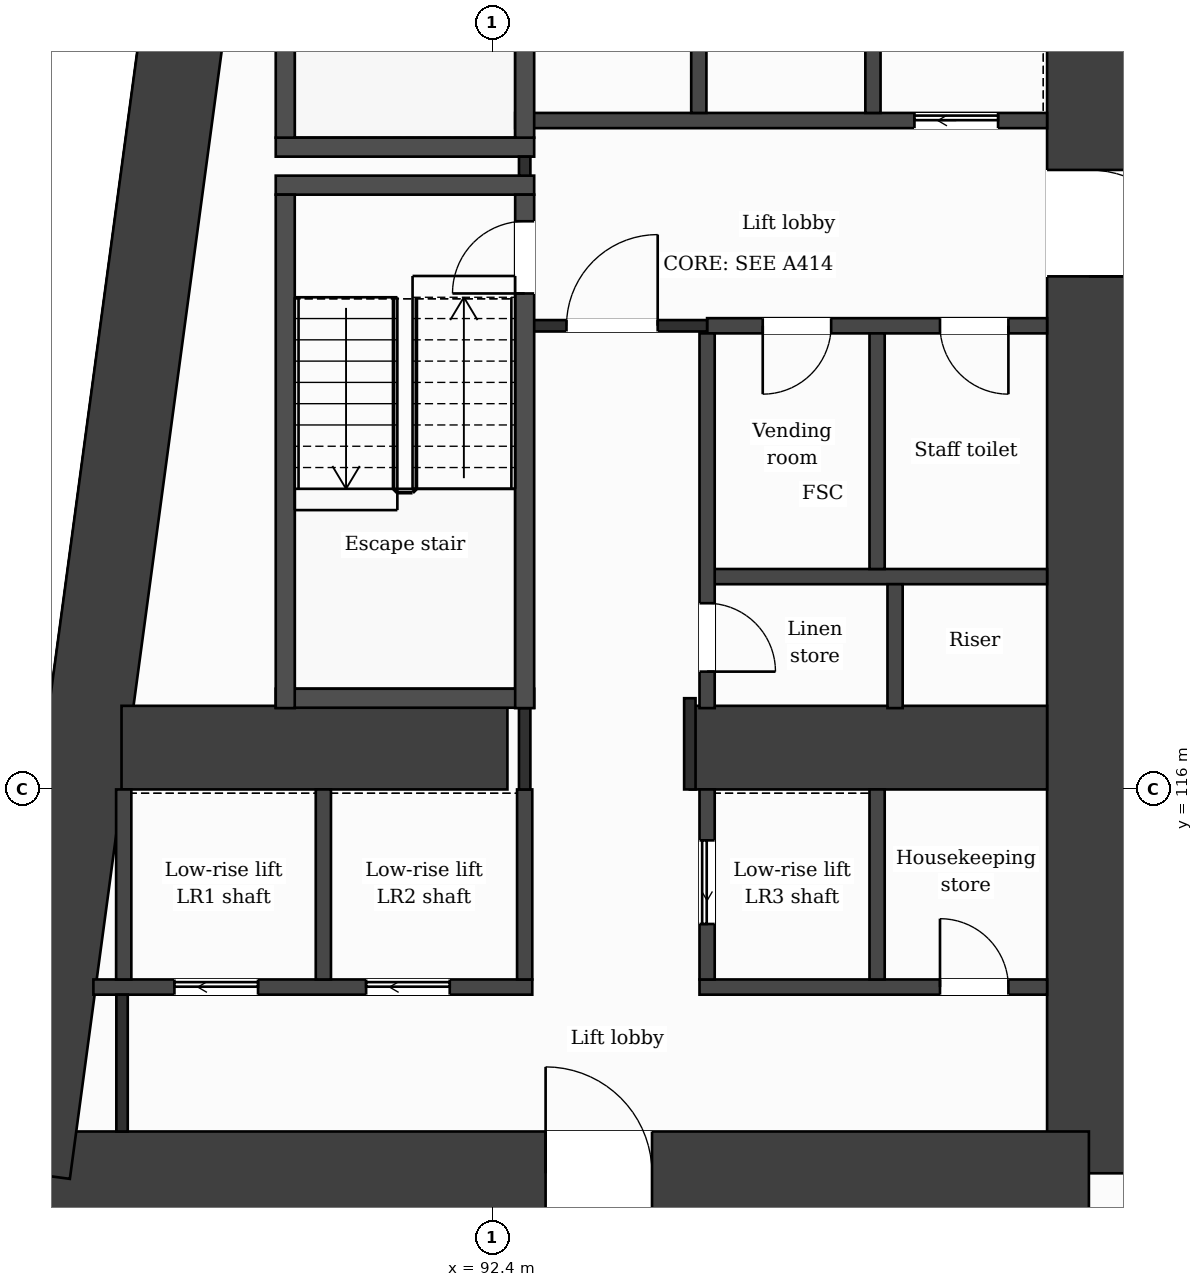
"""IFC4 building model, lengths in metres.
Left out: names, types, materials, properties, quantities, classifications, styles, units other than length and angle.
Written with IfcOpenShell. Run it as: python <this file> out.ifc"""

import sys

from ifc_helpers import new_model, si_unit, direction, frame, frame_2d, origin, place, context, subcontext, project, spatial, rectangle, extrude, element, fill, save


model = new_model("IFC4")
c1 = context("Model", 3, precision=1e-05, world=origin(), true_north=direction((0.0, 1.0)))
c2 = subcontext(c1, "Body", "Model", "MODEL_VIEW")
j1 = project(units=[si_unit("LENGTHUNIT", "METRE"), si_unit("PLANEANGLEUNIT", "RADIAN")], contexts=[c1])
p1 = place(None, origin())
s1 = spatial("IfcSite", under=j1, at=p1, CompositionType="ELEMENT")
p2 = place(p1, origin())
s2 = spatial("IfcBuilding", under=s1, at=p2, CompositionType="ELEMENT")
p3 = place(p2, frame((0.0, 0.0, 63.5)))
s3 = spatial("IfcBuildingStorey", under=s2, at=p3, CompositionType="ELEMENT", Elevation=63.5)
p4 = place(p3, frame((100.25, 131.85, 0.0), z_axis=(0.0, 0.0, 1.0), x_axis=(0.0, -1.0, 0.0)))
e1 = element("IfcWall", 1, at=p4, inside=s3, PredefinedType="SHEAR", context=c2, shape_type="SweptSolid", body=[
    extrude(rectangle(XDim=20.9, YDim=1.1, at=frame_2d((10.45, 0.0))), origin(), (0.0, 0.0, 1.0), 3.5),
])
p5 = place(p4, frame((7.7, 0.0, 0.0)))
e2 = element("IfcOpeningElement", 2, at=p5, cuts=e1, PredefinedType="OPENING", context=c2, shape_type="SweptSolid", body=[
    extrude(rectangle(XDim=1.4, YDim=2.1, at=frame_2d((0.7, 1.05))), frame((0.0, 0.56, 0.0), z_axis=(0.0, -1.0, 0.0), x_axis=(1.0, 0.0, 0.0)), (0.0, 0.0, 1.0), 1.12),
])
p6 = place(p3, frame((100.25, 110.95, 0.0), z_axis=(0.0, 0.0, 1.0), x_axis=(-1.0, 0.0, 0.0)))
e3 = element("IfcWall", 3, at=p6, inside=s3, PredefinedType="SHEAR", context=c2, shape_type="SweptSolid", body=[
    extrude(rectangle(XDim=13.952, YDim=1.1, at=frame_2d((6.976, 0.0))), origin(), (0.0, 0.0, 1.0), 3.5),
])
p7 = place(p6, frame((5.748, 0.0, 0.0)))
e4 = element("IfcOpeningElement", 4, at=p7, cuts=e3, PredefinedType="OPENING", context=c2, shape_type="SweptSolid", body=[
    extrude(rectangle(XDim=1.4, YDim=2.1, at=frame_2d((0.7, 1.05))), frame((0.0, 0.56, 0.0), z_axis=(0.0, -1.0, 0.0), x_axis=(1.0, 0.0, 0.0)), (0.0, 0.0, 1.0), 1.12),
])
p8 = place(p3, frame((86.298, 110.95, 0.0), z_axis=(0.0, 0.0, 1.0), x_axis=(0.133400422634, 0.99106222168, 0.0)))
e5 = element("IfcWall", 5, at=p8, inside=s3, PredefinedType="SHEAR", context=c2, shape_type="SweptSolid", body=[
    extrude(rectangle(XDim=21.089, YDim=1.1, at=frame_2d((10.544, 0.0))), origin(), (0.0, 0.0, 1.0), 3.5),
])
p9 = place(p3, frame((87.523, 116.55, 0.0), z_axis=(0.0, 0.0, 1.0), x_axis=(1.0, 0.0, 0.0)))
e6 = element("IfcWall", 6, at=p9, inside=s3, PredefinedType="SHEAR", context=c2, shape_type="SweptSolid", body=[
    extrude(rectangle(XDim=5.077, YDim=1.1, at=frame_2d((2.539, 0.0))), origin(), (0.0, 0.0, 1.0), 3.5),
])
p10 = place(p3, frame((95.0, 116.55, 0.0), z_axis=(0.0, 0.0, 1.0), x_axis=(1.0, 0.0, 0.0)))
e7 = element("IfcWall", 7, at=p10, inside=s3, PredefinedType="SHEAR", context=c2, shape_type="SweptSolid", body=[
    extrude(rectangle(XDim=4.7, YDim=1.1, at=frame_2d((2.35, 0.0))), origin(), (0.0, 0.0, 1.0), 3.5),
])
p11 = place(p3, frame((87.153, 113.4, 0.0), z_axis=(0.0, 0.0, 1.0), x_axis=(1.0, 0.0, 0.0)))
e8 = element("IfcWall", 8, at=p11, inside=s3, PredefinedType="PARTITIONING", context=c2, shape_type="SweptSolid", body=[
    extrude(rectangle(XDim=5.774, YDim=0.2, at=frame_2d((2.887, 0.0))), origin(), (0.0, 0.0, 1.0), 3.18),
])
p12 = place(p11, frame((1.066, 0.0, 0.0)))
e9 = element("IfcOpeningElement", 9, at=p12, cuts=e8, PredefinedType="OPENING", context=c2, shape_type="SweptSolid", body=[
    extrude(rectangle(XDim=1.1, YDim=2.1, at=frame_2d((0.55, 1.05))), frame((0.0, 0.11, 0.0), z_axis=(0.0, -1.0, 0.0), x_axis=(1.0, 0.0, 0.0)), (0.0, 0.0, 1.0), 0.22),
])
p13 = place(p11, frame((3.588, 0.0, 0.0)))
e10 = element("IfcOpeningElement", 10, at=p13, cuts=e8, PredefinedType="OPENING", context=c2, shape_type="SweptSolid", body=[
    extrude(rectangle(XDim=1.1, YDim=2.1, at=frame_2d((0.55, 1.05))), frame((0.0, 0.11, 0.0), z_axis=(0.0, -1.0, 0.0), x_axis=(1.0, 0.0, 0.0)), (0.0, 0.0, 1.0), 0.22),
])
p14 = place(p3, frame((95.127, 113.4, 0.0), z_axis=(0.0, 0.0, 1.0), x_axis=(1.0, 0.0, 0.0)))
e11 = element("IfcWall", 11, at=p14, inside=s3, PredefinedType="PARTITIONING", context=c2, shape_type="SweptSolid", body=[
    extrude(rectangle(XDim=4.573, YDim=0.2, at=frame_2d((2.287, 0.0))), origin(), (0.0, 0.0, 1.0), 3.18),
])
p15 = place(p14, frame((3.164, 0.0, 0.0)))
e12 = element("IfcOpeningElement", 12, at=p15, cuts=e11, PredefinedType="OPENING", context=c2, shape_type="SweptSolid", body=[
    extrude(rectangle(XDim=0.9, YDim=2.1, at=frame_2d((0.45, 1.05))), frame((0.0, 0.11, 0.0), z_axis=(0.0, -1.0, 0.0), x_axis=(1.0, 0.0, 0.0)), (0.0, 0.0, 1.0), 0.22),
])
p16 = place(p3, frame((89.552, 117.2, 0.0), z_axis=(0.0, 0.0, 1.0), x_axis=(1.0, 0.0, 0.0)))
e13 = element("IfcWall", 13, at=p16, inside=s3, PredefinedType="PARTITIONING", context=c2, shape_type="SweptSolid", body=[
    extrude(rectangle(XDim=3.4, YDim=0.25, at=frame_2d((1.7, 0.0))), origin(), (0.0, 0.0, 1.0), 3.18),
])
p17 = place(p3, frame((95.227, 118.8, 0.0), z_axis=(0.0, 0.0, 1.0), x_axis=(1.0, 0.0, 0.0)))
e14 = element("IfcWall", 14, at=p17, inside=s3, PredefinedType="PARTITIONING", context=c2, shape_type="SweptSolid", body=[
    extrude(rectangle(XDim=4.473, YDim=0.2, at=frame_2d((2.236, 0.0))), origin(), (0.0, 0.0, 1.0), 3.18),
])
p18 = place(p3, frame((95.227, 122.1, 0.0), z_axis=(0.0, 0.0, 1.0), x_axis=(1.0, 0.0, 0.0)))
e15 = element("IfcWall", 15, at=p18, inside=s3, PredefinedType="PARTITIONING", context=c2, shape_type="SweptSolid", body=[
    extrude(rectangle(XDim=4.473, YDim=0.2, at=frame_2d((2.236, 0.0))), origin(), (0.0, 0.0, 1.0), 3.18),
])
p19 = place(p18, frame((0.732, 0.0, 0.0)))
e16 = element("IfcOpeningElement", 16, at=p19, cuts=e15, PredefinedType="OPENING", context=c2, shape_type="SweptSolid", body=[
    extrude(rectangle(XDim=0.9, YDim=2.1, at=frame_2d((0.45, 1.05))), frame((0.0, 0.11, 0.0), z_axis=(0.0, -1.0, 0.0), x_axis=(1.0, 0.0, 0.0)), (0.0, 0.0, 1.0), 0.22),
])
p20 = place(p18, frame((3.064, 0.0, 0.0)))
e17 = element("IfcOpeningElement", 17, at=p20, cuts=e15, PredefinedType="OPENING", context=c2, shape_type="SweptSolid", body=[
    extrude(rectangle(XDim=0.9, YDim=2.1, at=frame_2d((0.45, 1.05))), frame((0.0, 0.11, 0.0), z_axis=(0.0, -1.0, 0.0), x_axis=(1.0, 0.0, 0.0)), (0.0, 0.0, 1.0), 0.22),
])
p21 = place(p3, frame((92.827, 122.1, 0.0), z_axis=(0.0, 0.0, 1.0), x_axis=(1.0, 0.0, 0.0)))
e18 = element("IfcWall", 18, at=p21, inside=s3, PredefinedType="PARTITIONING", context=c2, shape_type="SweptSolid", body=[
    extrude(rectangle(XDim=2.4, YDim=0.15, at=frame_2d((1.2, 0.0))), origin(), (0.0, 0.0, 1.0), 3.18),
])
p22 = place(p21, frame((0.55, 0.0, 0.0)))
e19 = element("IfcOpeningElement", 19, at=p22, cuts=e18, PredefinedType="OPENING", context=c2, shape_type="SweptSolid", body=[
    extrude(rectangle(XDim=1.2, YDim=2.1, at=frame_2d((0.6, 1.05))), frame((0.0, 0.085, 0.0), z_axis=(0.0, -1.0, 0.0), x_axis=(1.0, 0.0, 0.0)), (0.0, 0.0, 1.0), 0.17),
])
for number, where, z_axis, x_axis in (
    (20, (89.552, 123.95, 0.0), (0.0, 0.0, 1.0), (1.0, 0.0, 0.0)),
    (21, (89.552, 124.45, 0.0), (0.0, 0.0, 1.0), (1.0, 0.0, 0.0)),
):
    element("IfcWall", number, at=place(p3, frame(where, z_axis=z_axis, x_axis=x_axis)), inside=s3, PredefinedType="PARTITIONING", context=c2, shape_type="SweptSolid", body=[
        extrude(rectangle(XDim=3.4, YDim=0.25, at=frame_2d((1.7, 0.0))), origin(), (0.0, 0.0, 1.0), 3.18),
    ])
p23 = place(p3, frame((92.702, 124.8, 0.0), z_axis=(0.0, 0.0, 1.0), x_axis=(1.0, 0.0, 0.0)))
e22 = element("IfcWall", 22, at=p23, inside=s3, PredefinedType="PARTITIONING", context=c2, shape_type="SweptSolid", body=[
    extrude(rectangle(XDim=6.998, YDim=0.2, at=frame_2d((3.499, 0.0))), origin(), (0.0, 0.0, 1.0), 3.18),
])
p24 = place(p23, frame((5.253, 0.0, 0.0)))
e23 = element("IfcOpeningElement", 23, at=p24, cuts=e22, PredefinedType="OPENING", context=c2, shape_type="SweptSolid", body=[
    extrude(rectangle(XDim=1.1, YDim=2.1, at=frame_2d((0.55, 1.05))), frame((0.0, 0.11, 0.0), z_axis=(0.0, -1.0, 0.0), x_axis=(1.0, 0.0, 0.0)), (0.0, 0.0, 1.0), 0.22),
])
p25 = place(p3, frame((87.552, 113.5, 0.0), z_axis=(0.0, 0.0, 1.0), x_axis=(0.0, 1.0, 0.0)))
e24 = element("IfcWall", 24, at=p25, inside=s3, PredefinedType="PARTITIONING", context=c2, shape_type="SweptSolid", body=[
    extrude(rectangle(XDim=2.5, YDim=0.2, at=frame_2d((1.25, 0.0))), origin(), (0.0, 0.0, 1.0), 3.18),
])
p26 = place(p3, frame((87.53, 111.5, 0.0), z_axis=(0.0, 0.0, 1.0), x_axis=(0.0, 1.0, 0.0)))
e25 = element("IfcWall", 25, at=p26, inside=s3, PredefinedType="PARTITIONING", context=c2, shape_type="SweptSolid", body=[
    extrude(rectangle(XDim=1.8, YDim=0.15, at=frame_2d((0.9, 0.0))), origin(), (0.0, 0.0, 1.0), 3.18),
])
p27 = place(p3, frame((89.677, 117.07, 0.0), z_axis=(0.0, 0.0, 1.0), x_axis=(0.0, 1.0, 0.0)))
e26 = element("IfcWall", 26, at=p27, inside=s3, PredefinedType="PARTITIONING", context=c2, shape_type="SweptSolid", body=[
    extrude(rectangle(XDim=6.755, YDim=0.25, at=frame_2d((3.377, 0.0))), origin(), (0.0, 0.0, 1.0), 3.18),
])
p28 = place(p3, frame((89.677, 124.575, 0.0), z_axis=(0.0, 0.0, 1.0), x_axis=(0.0, 1.0, 0.0)))
e27 = element("IfcWall", 27, at=p28, inside=s3, PredefinedType="PARTITIONING", context=c2, shape_type="SweptSolid", body=[
    extrude(rectangle(XDim=6.5, YDim=0.25, at=frame_2d((3.25, 0.0))), origin(), (0.0, 0.0, 1.0), 3.18),
])
for number, where, z_axis, x_axis in (
    (28, (90.178, 113.5, 0.0), (0.0, 0.0, 1.0), (0.0, 1.0, 0.0)),
    (29, (92.827, 113.5, 0.0), (0.0, 0.0, 1.0), (0.0, 1.0, 0.0)),
):
    element("IfcWall", number, at=place(p3, frame(where, z_axis=z_axis, x_axis=x_axis)), inside=s3, PredefinedType="PARTITIONING", context=c2, shape_type="SweptSolid", body=[
        extrude(rectangle(XDim=2.5, YDim=0.2, at=frame_2d((1.25, 0.0))), origin(), (0.0, 0.0, 1.0), 3.18),
    ])
p29 = place(p3, frame((92.827, 116.0, 0.0), z_axis=(0.0, 0.0, 1.0), x_axis=(0.0, 1.0, 0.0)))
e30 = element("IfcWall", 30, at=p29, inside=s3, PredefinedType="PARTITIONING", context=c2, shape_type="SweptSolid", body=[
    extrude(rectangle(XDim=1.07, YDim=0.15, at=frame_2d((0.535, 0.0))), origin(), (0.0, 0.0, 1.0), 3.18),
])
p30 = place(p3, frame((92.827, 124.075, 0.0), z_axis=(0.0, 0.0, 1.0), x_axis=(0.0, 1.0, 0.0)))
e31 = element("IfcWall", 31, at=p30, inside=s3, PredefinedType="PARTITIONING", context=c2, shape_type="SweptSolid", body=[
    extrude(rectangle(XDim=0.25, YDim=0.15, at=frame_2d((0.125, 0.0))), origin(), (0.0, 0.0, 1.0), 3.18),
])
p31 = place(p3, frame((92.827, 117.07, 0.0), z_axis=(0.0, 0.0, 1.0), x_axis=(0.0, 1.0, 0.0)))
e32 = element("IfcWall", 32, at=p31, inside=s3, PredefinedType="PARTITIONING", context=c2, shape_type="SweptSolid", body=[
    extrude(rectangle(XDim=6.755, YDim=0.25, at=frame_2d((3.377, 0.0))), origin(), (0.0, 0.0, 1.0), 3.18),
])
p32 = place(p31, frame((5.455, 0.0, 0.0)))
e33 = element("IfcOpeningElement", 33, at=p32, cuts=e32, PredefinedType="OPENING", context=c2, shape_type="SweptSolid", body=[
    extrude(rectangle(XDim=0.95, YDim=2.1, at=frame_2d((0.475, 1.05))), frame((0.0, 0.135, 0.0), z_axis=(0.0, -1.0, 0.0), x_axis=(1.0, 0.0, 0.0)), (0.0, 0.0, 1.0), 0.27),
])
p33 = place(p3, frame((92.827, 124.575, 0.0), z_axis=(0.0, 0.0, 1.0), x_axis=(0.0, 1.0, 0.0)))
e34 = element("IfcWall", 34, at=p33, inside=s3, PredefinedType="PARTITIONING", context=c2, shape_type="SweptSolid", body=[
    extrude(rectangle(XDim=6.755, YDim=0.25, at=frame_2d((3.377, 0.0))), origin(), (0.0, 0.0, 1.0), 3.18),
])
p34 = place(p33, frame((5.325, 0.0, 0.0)))
e35 = element("IfcOpeningElement", 35, at=p34, cuts=e34, PredefinedType="OPENING", context=c2, shape_type="SweptSolid", body=[
    extrude(rectangle(XDim=1.0, YDim=2.1, at=frame_2d((0.5, 1.05))), frame((0.0, 0.135, 0.0), z_axis=(0.0, -1.0, 0.0), x_axis=(1.0, 0.0, 0.0)), (0.0, 0.0, 1.0), 0.27),
])
p35 = place(p3, frame((95.0, 116.0, 0.0), z_axis=(0.0, 0.0, 1.0), x_axis=(0.0, 1.0, 0.0)))
e36 = element("IfcWall", 36, at=p35, inside=s3, PredefinedType="PARTITIONING", context=c2, shape_type="SweptSolid", body=[
    extrude(rectangle(XDim=1.2, YDim=0.15, at=frame_2d((0.6, 0.0))), origin(), (0.0, 0.0, 1.0), 3.18),
])
p36 = place(p3, frame((95.118, 124.9, 0.0), z_axis=(0.0, 0.0, 1.0), x_axis=(0.0, 1.0, 0.0)))
e37 = element("IfcWall", 37, at=p36, inside=s3, PredefinedType="PARTITIONING", context=c2, shape_type="SweptSolid", body=[
    extrude(rectangle(XDim=3.1, YDim=0.2, at=frame_2d((1.55, 0.0))), origin(), (0.0, 0.0, 1.0), 3.18),
])
p37 = place(p3, frame((95.227, 113.5, 0.0), z_axis=(0.0, 0.0, 1.0), x_axis=(0.0, 1.0, 0.0)))
e38 = element("IfcWall", 38, at=p37, inside=s3, PredefinedType="PARTITIONING", context=c2, shape_type="SweptSolid", body=[
    extrude(rectangle(XDim=2.5, YDim=0.2, at=frame_2d((1.25, 0.0))), origin(), (0.0, 0.0, 1.0), 3.18),
])
p38 = place(p37, frame((0.73, 0.0, 0.0)))
e39 = element("IfcOpeningElement", 39, at=p38, cuts=e38, PredefinedType="OPENING", context=c2, shape_type="SweptSolid", body=[
    extrude(rectangle(XDim=1.1, YDim=2.1, at=frame_2d((0.55, 1.05))), frame((0.0, 0.11, 0.0), z_axis=(0.0, -1.0, 0.0), x_axis=(1.0, 0.0, 0.0)), (0.0, 0.0, 1.0), 0.22),
])
p39 = place(p3, frame((95.227, 117.07, 0.0), z_axis=(0.0, 0.0, 1.0), x_axis=(0.0, 1.0, 0.0)))
e40 = element("IfcWall", 40, at=p39, inside=s3, PredefinedType="PARTITIONING", context=c2, shape_type="SweptSolid", body=[
    extrude(rectangle(XDim=4.93, YDim=0.2, at=frame_2d((2.465, 0.0))), origin(), (0.0, 0.0, 1.0), 3.18),
])
p40 = place(p39, frame((0.48, 0.0, 0.0)))
e41 = element("IfcOpeningElement", 41, at=p40, cuts=e40, PredefinedType="OPENING", context=c2, shape_type="SweptSolid", body=[
    extrude(rectangle(XDim=0.9, YDim=2.1, at=frame_2d((0.45, 1.05))), frame((0.0, 0.11, 0.0), z_axis=(0.0, -1.0, 0.0), x_axis=(1.0, 0.0, 0.0)), (0.0, 0.0, 1.0), 0.22),
])
p41 = place(p3, frame((97.409, 124.9, 0.0), z_axis=(0.0, 0.0, 1.0), x_axis=(0.0, 1.0, 0.0)))
e42 = element("IfcWall", 42, at=p41, inside=s3, PredefinedType="PARTITIONING", context=c2, shape_type="SweptSolid", body=[
    extrude(rectangle(XDim=3.1, YDim=0.2, at=frame_2d((1.55, 0.0))), origin(), (0.0, 0.0, 1.0), 3.18),
])
p42 = place(p3, frame((97.463, 113.5, 0.0), z_axis=(0.0, 0.0, 1.0), x_axis=(0.0, 1.0, 0.0)))
e43 = element("IfcWall", 43, at=p42, inside=s3, PredefinedType="PARTITIONING", context=c2, shape_type="SweptSolid", body=[
    extrude(rectangle(XDim=2.5, YDim=0.2, at=frame_2d((1.25, 0.0))), origin(), (0.0, 0.0, 1.0), 3.18),
])
p43 = place(p3, frame((97.463, 118.9, 0.0), z_axis=(0.0, 0.0, 1.0), x_axis=(0.0, 1.0, 0.0)))
e44 = element("IfcWall", 44, at=p43, inside=s3, PredefinedType="PARTITIONING", context=c2, shape_type="SweptSolid", body=[
    extrude(rectangle(XDim=3.1, YDim=0.2, at=frame_2d((1.55, 0.0))), origin(), (0.0, 0.0, 1.0), 3.18),
])
p44 = place(p3, frame((97.7, 117.07, 0.0), z_axis=(0.0, 0.0, 1.0), x_axis=(0.0, 1.0, 0.0)))
e45 = element("IfcWall", 45, at=p44, inside=s3, PredefinedType="PARTITIONING", context=c2, shape_type="SweptSolid", body=[
    extrude(rectangle(XDim=1.63, YDim=0.2, at=frame_2d((0.815, 0.0))), origin(), (0.0, 0.0, 1.0), 3.18),
])
p45 = place(p22, origin())
e46 = element("IfcDoor", 46, at=p45, inside=s3, OperationType="SINGLE_SWING_RIGHT", PredefinedType="DOOR", context=c2, shape_type="SweptSolid", body=[
    extrude(rectangle(XDim=1.2, YDim=2.1, at=frame_2d((0.6, 1.05))), frame((0.0, 0.025, 0.0), z_axis=(0.0, -1.0, 0.0), x_axis=(1.0, 0.0, 0.0)), (0.0, 0.0, 1.0), 0.05),
])
fill(e19, e46)
p46 = place(p24, origin())
e47 = element("IfcDoor", 47, at=p46, inside=s3, OperationType="SLIDING_TO_LEFT", PredefinedType="DOOR", context=c2, shape_type="SweptSolid", body=[
    extrude(rectangle(XDim=1.1, YDim=2.1, at=frame_2d((0.55, 1.05))), frame((0.0, 0.025, 0.0), z_axis=(0.0, -1.0, 0.0), x_axis=(1.0, 0.0, 0.0)), (0.0, 0.0, 1.0), 0.05),
])
fill(e23, e47)
p47 = place(p19, origin())
e48 = element("IfcDoor", 48, at=p47, inside=s3, OperationType="SINGLE_SWING_LEFT", PredefinedType="DOOR", context=c2, shape_type="SweptSolid", body=[
    extrude(rectangle(XDim=0.9, YDim=2.1, at=frame_2d((0.45, 1.05))), frame((0.0, 0.025, 0.0), z_axis=(0.0, -1.0, 0.0), x_axis=(1.0, 0.0, 0.0)), (0.0, 0.0, 1.0), 0.05),
])
fill(e16, e48)
p48 = place(p20, origin())
e49 = element("IfcDoor", 49, at=p48, inside=s3, OperationType="SINGLE_SWING_RIGHT", PredefinedType="DOOR", context=c2, shape_type="SweptSolid", body=[
    extrude(rectangle(XDim=0.9, YDim=2.1, at=frame_2d((0.45, 1.05))), frame((0.0, 0.025, 0.0), z_axis=(0.0, -1.0, 0.0), x_axis=(1.0, 0.0, 0.0)), (0.0, 0.0, 1.0), 0.05),
])
fill(e17, e49)
p49 = place(p32, origin())
e50 = element("IfcDoor", 50, at=p49, inside=s3, OperationType="SINGLE_SWING_LEFT", PredefinedType="DOOR", context=c2, shape_type="SweptSolid", body=[
    extrude(rectangle(XDim=0.95, YDim=2.1, at=frame_2d((0.475, 1.05))), frame((0.0, 0.025, 0.0), z_axis=(0.0, -1.0, 0.0), x_axis=(1.0, 0.0, 0.0)), (0.0, 0.0, 1.0), 0.05),
])
fill(e33, e50)
p50 = place(p40, origin())
e51 = element("IfcDoor", 51, at=p50, inside=s3, OperationType="SINGLE_SWING_LEFT", PredefinedType="DOOR", context=c2, shape_type="SweptSolid", body=[
    extrude(rectangle(XDim=0.9, YDim=2.1, at=frame_2d((0.45, 1.05))), frame((0.0, 0.025, 0.0), z_axis=(0.0, -1.0, 0.0), x_axis=(1.0, 0.0, 0.0)), (0.0, 0.0, 1.0), 0.05),
])
fill(e41, e51)
p51 = place(p12, origin())
e52 = element("IfcDoor", 52, at=p51, inside=s3, OperationType="SLIDING_TO_LEFT", PredefinedType="DOOR", context=c2, shape_type="SweptSolid", body=[
    extrude(rectangle(XDim=1.1, YDim=2.1, at=frame_2d((0.55, 1.05))), frame((0.0, 0.025, 0.0), z_axis=(0.0, -1.0, 0.0), x_axis=(1.0, 0.0, 0.0)), (0.0, 0.0, 1.0), 0.05),
])
fill(e9, e52)
p52 = place(p13, origin())
e53 = element("IfcDoor", 53, at=p52, inside=s3, OperationType="SLIDING_TO_LEFT", PredefinedType="DOOR", context=c2, shape_type="SweptSolid", body=[
    extrude(rectangle(XDim=1.1, YDim=2.1, at=frame_2d((0.55, 1.05))), frame((0.0, 0.025, 0.0), z_axis=(0.0, -1.0, 0.0), x_axis=(1.0, 0.0, 0.0)), (0.0, 0.0, 1.0), 0.05),
])
fill(e10, e53)
p53 = place(p38, origin())
e54 = element("IfcDoor", 54, at=p53, inside=s3, OperationType="SLIDING_TO_LEFT", PredefinedType="DOOR", context=c2, shape_type="SweptSolid", body=[
    extrude(rectangle(XDim=1.1, YDim=2.1, at=frame_2d((0.55, 1.05))), frame((0.0, 0.025, 0.0), z_axis=(0.0, -1.0, 0.0), x_axis=(1.0, 0.0, 0.0)), (0.0, 0.0, 1.0), 0.05),
])
fill(e39, e54)
p54 = place(p15, origin())
e55 = element("IfcDoor", 55, at=p54, inside=s3, OperationType="SINGLE_SWING_LEFT", PredefinedType="DOOR", context=c2, shape_type="SweptSolid", body=[
    extrude(rectangle(XDim=0.9, YDim=2.1, at=frame_2d((0.45, 1.05))), frame((0.0, 0.025, 0.0), z_axis=(0.0, -1.0, 0.0), x_axis=(1.0, 0.0, 0.0)), (0.0, 0.0, 1.0), 0.05),
])
fill(e12, e55)
p55 = place(p7, origin())
e56 = element("IfcDoor", 56, at=p55, inside=s3, OperationType="SINGLE_SWING_RIGHT", PredefinedType="DOOR", context=c2, shape_type="SweptSolid", body=[
    extrude(rectangle(XDim=1.4, YDim=2.1, at=frame_2d((0.7, 1.05))), frame((0.0, 0.025, 0.0), z_axis=(0.0, -1.0, 0.0), x_axis=(1.0, 0.0, 0.0)), (0.0, 0.0, 1.0), 0.05),
])
fill(e4, e56)
p56 = place(p5, origin())
e57 = element("IfcDoor", 57, at=p56, inside=s3, OperationType="SINGLE_SWING_RIGHT", PredefinedType="DOOR", context=c2, shape_type="SweptSolid", body=[
    extrude(rectangle(XDim=1.4, YDim=2.1, at=frame_2d((0.7, 1.05))), frame((0.0, 0.025, 0.0), z_axis=(0.0, -1.0, 0.0), x_axis=(1.0, 0.0, 0.0)), (0.0, 0.0, 1.0), 0.05),
])
fill(e2, e57)
save(model, sys.argv[1])
